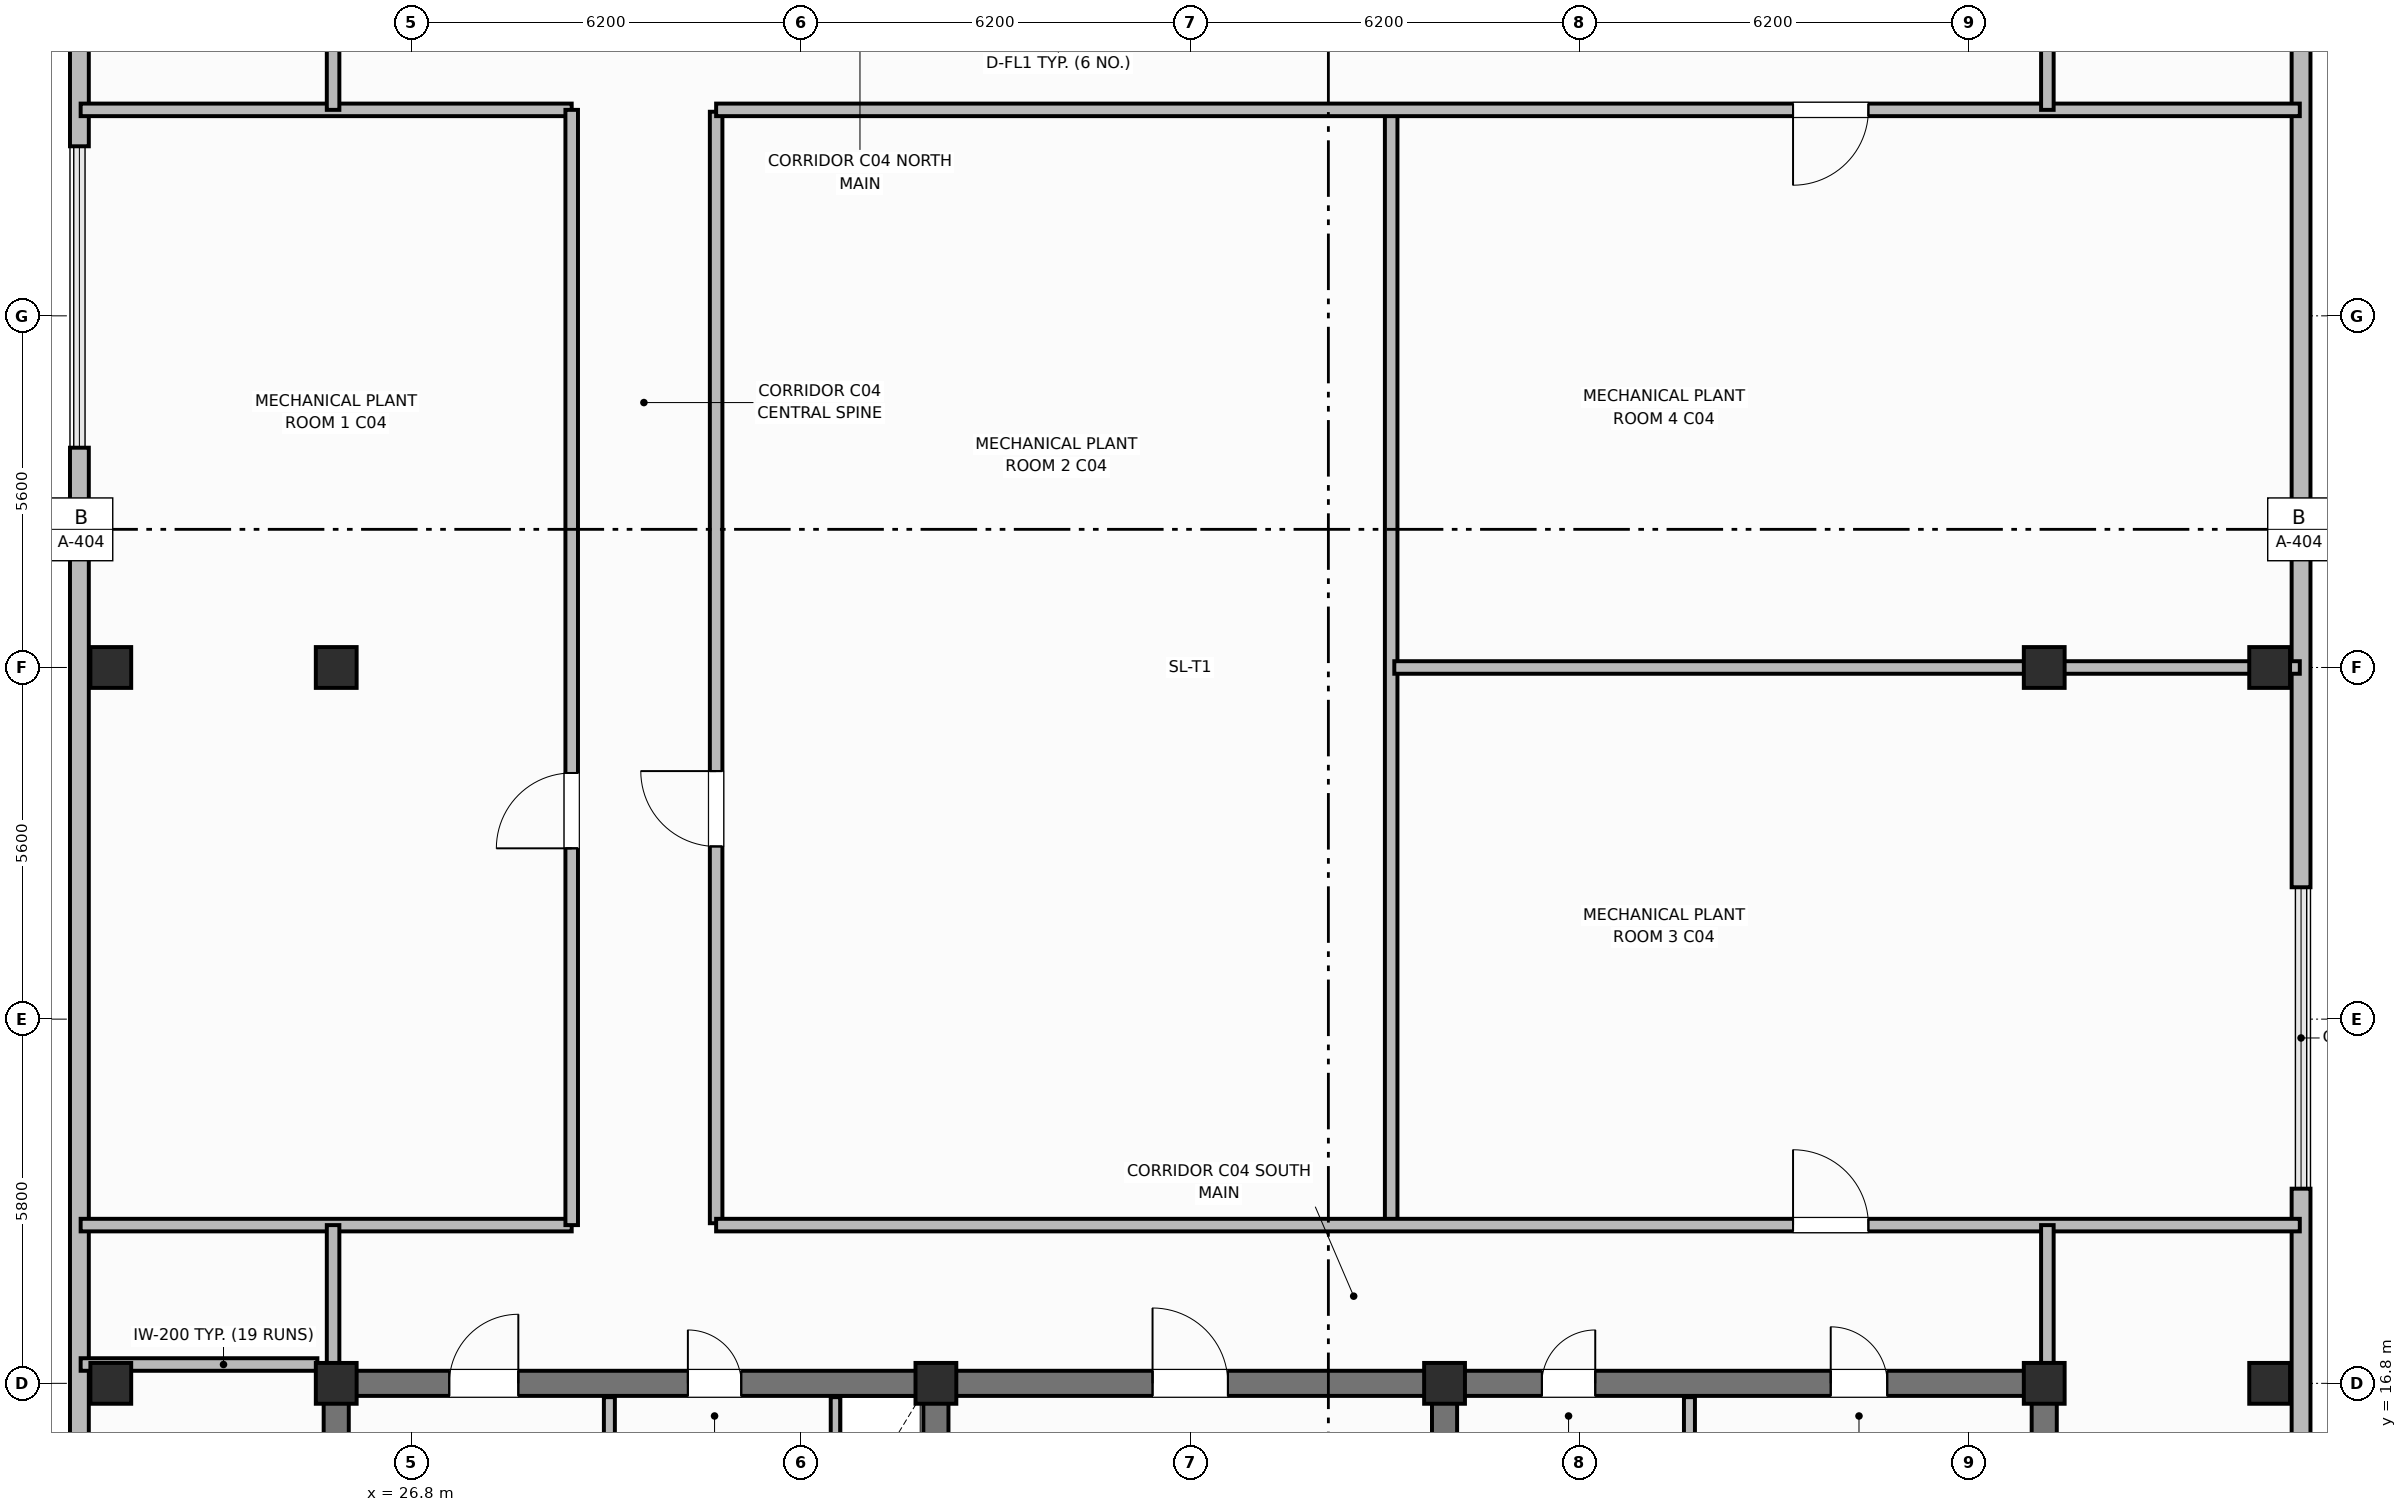
"""IFC4 building model, lengths in metres.
Left out: names, types, materials, properties, quantities, classifications, styles, units other than length and angle.
Written with IfcOpenShell. Run it as: python <this file> out.ifc"""

import sys

from ifc_helpers import new_model, si_unit, direction, frame, frame_2d, origin, origin_2d, place, context, subcontext, project, spatial, rectangle, extrude, element, fill, save


model = new_model("IFC4")
c1 = context("Model", 3, precision=1e-05, world=origin(), true_north=direction((0.0, 1.0)))
c2 = subcontext(c1, "Body", "Model", "MODEL_VIEW")
j1 = project(units=[si_unit("LENGTHUNIT", "METRE"), si_unit("PLANEANGLEUNIT", "RADIAN")], contexts=[c1])
p1 = place(None, origin())
s1 = spatial("IfcSite", under=j1, at=p1, CompositionType="ELEMENT")
p2 = place(p1, origin())
s2 = spatial("IfcBuilding", under=s1, at=p2, CompositionType="ELEMENT")
p3 = place(p2, frame((0.0, 0.0, 312.8)))
s3 = spatial("IfcBuildingStorey", under=s2, at=p3, CompositionType="ELEMENT", Elevation=312.8)
for number, where, z_axis, x_axis in (
    (1, (25.6, 10.8, 0.0), (0.0, 0.0, 1.0), (0.0, 1.0, 0.0)),
    (2, (52.8, 10.8, 0.0), (0.0, 0.0, 1.0), (0.0, 1.0, 0.0)),
):
    element("IfcWall", number, at=place(p3, frame(where, z_axis=z_axis, x_axis=x_axis)), inside=s3, PredefinedType="SHEAR", context=c2, shape_type="SweptSolid", body=[
        extrude(rectangle(XDim=5.8, YDim=0.4, at=frame_2d((2.9, 0.0))), origin(), (0.0, 0.0, 1.0), 3.6),
    ])
p4 = place(p3, frame((25.6, 16.8, 0.0), z_axis=(0.0, 0.0, 1.0), x_axis=(1.0, 0.0, 0.0)))
e3 = element("IfcWall", 3, at=p4, inside=s3, PredefinedType="SHEAR", context=c2, shape_type="SweptSolid", body=[
    extrude(rectangle(XDim=27.2, YDim=0.4, at=frame_2d((13.6, 0.0))), origin(), (0.0, 0.0, 1.0), 3.6),
])
p5 = place(p4, frame((1.8, 0.0, 0.0)))
e4 = element("IfcOpeningElement", 4, at=p5, cuts=e3, PredefinedType="OPENING", context=c2, shape_type="SweptSolid", body=[
    extrude(rectangle(XDim=1.1, YDim=2.15, at=frame_2d((0.55, 1.075))), frame((0.0, 0.21, 0.0), z_axis=(0.0, -1.0, 0.0), x_axis=(1.0, 0.0, 0.0)), (0.0, 0.0, 1.0), 0.42),
])
p6 = place(p4, frame((5.6, 0.0, 0.0)))
e5 = element("IfcOpeningElement", 5, at=p6, cuts=e3, PredefinedType="OPENING", context=c2, shape_type="SweptSolid", body=[
    extrude(rectangle(XDim=0.85, YDim=2.1, at=frame_2d((0.425, 1.05))), frame((0.0, 0.21, 0.0), z_axis=(0.0, -1.0, 0.0), x_axis=(1.0, 0.0, 0.0)), (0.0, 0.0, 1.0), 0.42),
])
p7 = place(p4, frame((13.0, 0.0, 0.0)))
e6 = element("IfcOpeningElement", 6, at=p7, cuts=e3, PredefinedType="OPENING", context=c2, shape_type="SweptSolid", body=[
    extrude(rectangle(XDim=1.2, YDim=2.15, at=frame_2d((0.6, 1.075))), frame((0.0, 0.21, 0.0), z_axis=(0.0, -1.0, 0.0), x_axis=(1.0, 0.0, 0.0)), (0.0, 0.0, 1.0), 0.42),
])
p8 = place(p4, frame((19.2, 0.0, 0.0)))
e7 = element("IfcOpeningElement", 7, at=p8, cuts=e3, PredefinedType="OPENING", context=c2, shape_type="SweptSolid", body=[
    extrude(rectangle(XDim=0.85, YDim=2.1, at=frame_2d((0.425, 1.05))), frame((0.0, 0.21, 0.0), z_axis=(0.0, -1.0, 0.0), x_axis=(1.0, 0.0, 0.0)), (0.0, 0.0, 1.0), 0.42),
])
p9 = place(p4, frame((23.8, 0.0, 0.0)))
e8 = element("IfcOpeningElement", 8, at=p9, cuts=e3, PredefinedType="OPENING", context=c2, shape_type="SweptSolid", body=[
    extrude(rectangle(XDim=0.9, YDim=2.1, at=frame_2d((0.45, 1.05))), frame((0.0, 0.21, 0.0), z_axis=(0.0, -1.0, 0.0), x_axis=(1.0, 0.0, 0.0)), (0.0, 0.0, 1.0), 0.42),
])
for number, where, z_axis, x_axis in (
    (9, (35.15, 10.8, 0.0), (0.0, 0.0, 1.0), (0.0, 1.0, 0.0)),
    (10, (43.25, 10.8, 0.0), (0.0, 0.0, 1.0), (0.0, 1.0, 0.0)),
):
    element("IfcWall", number, at=place(p3, frame(where, z_axis=z_axis, x_axis=x_axis)), inside=s3, PredefinedType="SHEAR", context=c2, shape_type="SweptSolid", body=[
        extrude(rectangle(XDim=5.8, YDim=0.4, at=frame_2d((2.9, 0.0))), origin(), (0.0, 0.0, 1.0), 3.6),
    ])
for number, where, z_axis, x_axis in (
    (11, (25.6, 16.8, 0.0), (0.0, 0.0, 1.0), (1.0, 0.0, 0.0)),
    (12, (35.15, 16.8, 0.0), (0.0, 0.0, 1.0), (1.0, 0.0, 0.0)),
    (13, (43.25, 16.8, 0.0), (0.0, 0.0, 1.0), (1.0, 0.0, 0.0)),
    (14, (52.8, 16.8, 0.0), (0.0, 0.0, 1.0), (1.0, 0.0, 0.0)),
    (15, (25.6, 28.2, 0.0), (0.0, 0.0, 1.0), (1.0, 0.0, 0.0)),
    (16, (52.8, 28.2, 0.0), (0.0, 0.0, 1.0), (1.0, 0.0, 0.0)),
    (17, (22.01, 16.8, 0.0), (0.0, 0.0, 1.0), (1.0, 0.0, 0.0)),
    (18, (56.39, 16.8, 0.0), (0.0, 0.0, 1.0), (1.0, 0.0, 0.0)),
    (19, (22.01, 28.2, 0.0), (0.0, 0.0, 1.0), (1.0, 0.0, 0.0)),
    (20, (56.39, 28.2, 0.0), (0.0, 0.0, 1.0), (1.0, 0.0, 0.0)),
):
    element("IfcColumn", number, at=place(p3, frame(where, z_axis=z_axis, x_axis=x_axis)), inside=s3, PredefinedType="COLUMN", context=c2, shape_type="SweptSolid", body=[
        extrude(rectangle(XDim=0.65, YDim=0.65, at=origin_2d()), origin(), (0.0, 0.0, 1.0), 3.6),
    ])
p10 = place(p3, frame((56.89, 12.25, 0.0), z_axis=(0.0, 0.0, 1.0), x_axis=(0.0, 1.0, 0.0)))
e21 = element("IfcWall", 21, at=p10, inside=s3, PredefinedType="SOLIDWALL", context=c2, shape_type="SweptSolid", body=[
    extrude(rectangle(XDim=7.65, YDim=0.3, at=frame_2d((3.825, 0.0))), origin(), (0.0, 0.0, 1.0), 2.84),
])
p11 = place(p3, frame((56.89, 24.7, 0.0), z_axis=(0.0, 0.0, 1.0), x_axis=(0.0, 1.0, 0.0)))
e22 = element("IfcWall", 22, at=p11, inside=s3, PredefinedType="SOLIDWALL", context=c2, shape_type="SweptSolid", body=[
    extrude(rectangle(XDim=19.45, YDim=0.3, at=frame_2d((9.725, 0.0))), origin(), (0.0, 0.0, 1.0), 2.84),
])
p12 = place(p3, frame((21.51, 44.15, 0.0), z_axis=(0.0, 0.0, 1.0), x_axis=(0.0, -1.0, 0.0)))
e23 = element("IfcWall", 23, at=p12, inside=s3, PredefinedType="SOLIDWALL", context=c2, shape_type="SweptSolid", body=[
    extrude(rectangle(XDim=7.65, YDim=0.3, at=frame_2d((3.825, 0.0))), origin(), (0.0, 0.0, 1.0), 2.84),
])
p13 = place(p3, frame((21.51, 31.7, 0.0), z_axis=(0.0, 0.0, 1.0), x_axis=(0.0, -1.0, 0.0)))
e24 = element("IfcWall", 24, at=p13, inside=s3, PredefinedType="SOLIDWALL", context=c2, shape_type="SweptSolid", body=[
    extrude(rectangle(XDim=19.45, YDim=0.3, at=frame_2d((9.725, 0.0))), origin(), (0.0, 0.0, 1.0), 2.84),
])
p14 = place(p3, frame((29.95, 14.5, 0.0), z_axis=(0.0, 0.0, 1.0), x_axis=(0.0, 1.0, 0.0)))
e25 = element("IfcWall", 25, at=p14, inside=s3, PredefinedType="PARTITIONING", context=c2, shape_type="SweptSolid", body=[
    extrude(rectangle(XDim=2.08, YDim=0.175, at=frame_2d((1.04, 0.0))), origin(), (0.0, 0.0, 1.0), 2.54),
])
p15 = place(p3, frame((33.55, 14.5, 0.0), z_axis=(0.0, 0.0, 1.0), x_axis=(0.0, 1.0, 0.0)))
e26 = element("IfcWall", 26, at=p15, inside=s3, PredefinedType="PARTITIONING", context=c2, shape_type="SweptSolid", body=[
    extrude(rectangle(XDim=2.08, YDim=0.15, at=frame_2d((1.04, 0.0))), origin(), (0.0, 0.0, 1.0), 2.54),
])
p16 = place(p15, frame((0.55, 0.0, 0.0)))
e27 = element("IfcOpeningElement", 27, at=p16, cuts=e26, PredefinedType="OPENING", context=c2, shape_type="SweptSolid", body=[
    extrude(rectangle(XDim=0.85, YDim=2.05, at=frame_2d((0.425, 1.025))), frame((0.0, 0.085, 0.0), z_axis=(0.0, -1.0, 0.0), x_axis=(1.0, 0.0, 0.0)), (0.0, 0.0, 1.0), 0.17),
])
p17 = place(p3, frame((47.15, 10.95, 0.0), z_axis=(0.0, 0.0, 1.0), x_axis=(0.0, 1.0, 0.0)))
e28 = element("IfcWall", 28, at=p17, inside=s3, PredefinedType="PARTITIONING", context=c2, shape_type="SweptSolid", body=[
    extrude(rectangle(XDim=5.63, YDim=0.175, at=frame_2d((2.815, 0.0))), origin(), (0.0, 0.0, 1.0), 2.54),
])
for number, where, z_axis, x_axis in (
    (29, (21.53, 19.32, 0.0), (0.0, 0.0, 1.0), (1.0, 0.0, 0.0)),
    (30, (21.53, 37.08, 0.0), (0.0, 0.0, 1.0), (1.0, 0.0, 0.0)),
):
    element("IfcWall", number, at=place(p3, frame(where, z_axis=z_axis, x_axis=x_axis)), inside=s3, PredefinedType="PARTITIONING", context=c2, shape_type="SweptSolid", body=[
        extrude(rectangle(XDim=7.82, YDim=0.2, at=frame_2d((3.91, 0.0))), origin(), (0.0, 0.0, 1.0), 2.54),
    ])
p18 = place(p3, frame((29.35, 19.32, 0.0), z_axis=(0.0, 0.0, 1.0), x_axis=(0.0, 1.0, 0.0)))
e31 = element("IfcWall", 31, at=p18, inside=s3, PredefinedType="PARTITIONING", context=c2, shape_type="SweptSolid", body=[
    extrude(rectangle(XDim=17.76, YDim=0.2, at=frame_2d((8.88, 0.0))), origin(), (0.0, 0.0, 1.0), 2.54),
])
p19 = place(p18, frame((6.0, 0.0, 0.0)))
e32 = element("IfcOpeningElement", 32, at=p19, cuts=e31, PredefinedType="OPENING", context=c2, shape_type="SweptSolid", body=[
    extrude(rectangle(XDim=1.2, YDim=2.15, at=frame_2d((0.6, 1.075))), frame((0.0, 0.11, 0.0), z_axis=(0.0, -1.0, 0.0), x_axis=(1.0, 0.0, 0.0)), (0.0, 0.0, 1.0), 0.22),
])
p20 = place(p3, frame((31.65, 19.35, 0.0), z_axis=(0.0, 0.0, 1.0), x_axis=(0.0, 1.0, 0.0)))
e33 = element("IfcWall", 33, at=p20, inside=s3, PredefinedType="PARTITIONING", context=c2, shape_type="SweptSolid", body=[
    extrude(rectangle(XDim=17.7, YDim=0.2, at=frame_2d((8.85, 0.0))), origin(), (0.0, 0.0, 1.0), 2.54),
])
p21 = place(p20, frame((6.0, 0.0, 0.0)))
e34 = element("IfcOpeningElement", 34, at=p21, cuts=e33, PredefinedType="OPENING", context=c2, shape_type="SweptSolid", body=[
    extrude(rectangle(XDim=1.2, YDim=2.15, at=frame_2d((0.6, 1.075))), frame((0.0, 0.11, 0.0), z_axis=(0.0, -1.0, 0.0), x_axis=(1.0, 0.0, 0.0)), (0.0, 0.0, 1.0), 0.22),
])
p22 = place(p3, frame((42.4, 19.35, 0.0), z_axis=(0.0, 0.0, 1.0), x_axis=(0.0, 1.0, 0.0)))
e35 = element("IfcWall", 35, at=p22, inside=s3, PredefinedType="PARTITIONING", context=c2, shape_type="SweptSolid", body=[
    extrude(rectangle(XDim=17.7, YDim=0.2, at=frame_2d((8.85, 0.0))), origin(), (0.0, 0.0, 1.0), 2.54),
])
p23 = place(p3, frame((42.45, 28.2, 0.0), z_axis=(0.0, 0.0, 1.0), x_axis=(1.0, 0.0, 0.0)))
e36 = element("IfcWall", 36, at=p23, inside=s3, PredefinedType="PARTITIONING", context=c2, shape_type="SweptSolid", body=[
    extrude(rectangle(XDim=14.42, YDim=0.2, at=frame_2d((7.21, 0.0))), origin(), (0.0, 0.0, 1.0), 2.54),
])
p24 = place(p3, frame((31.65, 19.32, 0.0), z_axis=(0.0, 0.0, 1.0), x_axis=(1.0, 0.0, 0.0)))
e37 = element("IfcWall", 37, at=p24, inside=s3, PredefinedType="PARTITIONING", context=c2, shape_type="SweptSolid", body=[
    extrude(rectangle(XDim=25.22, YDim=0.2, at=frame_2d((12.61, 0.0))), origin(), (0.0, 0.0, 1.0), 2.54),
])
p25 = place(p24, frame((17.15, 0.0, 0.0)))
e38 = element("IfcOpeningElement", 38, at=p25, cuts=e37, PredefinedType="OPENING", context=c2, shape_type="SweptSolid", body=[
    extrude(rectangle(XDim=1.2, YDim=2.15, at=frame_2d((0.6, 1.075))), frame((0.0, 0.11, 0.0), z_axis=(0.0, -1.0, 0.0), x_axis=(1.0, 0.0, 0.0)), (0.0, 0.0, 1.0), 0.22),
])
p26 = place(p3, frame((56.87, 37.08, 0.0), z_axis=(0.0, 0.0, 1.0), x_axis=(-1.0, 0.0, 0.0)))
e39 = element("IfcWall", 39, at=p26, inside=s3, PredefinedType="PARTITIONING", context=c2, shape_type="SweptSolid", body=[
    extrude(rectangle(XDim=25.22, YDim=0.2, at=frame_2d((12.61, 0.0))), origin(), (0.0, 0.0, 1.0), 2.54),
])
p27 = place(p26, frame((6.87, 0.0, 0.0)))
e40 = element("IfcOpeningElement", 40, at=p27, cuts=e39, PredefinedType="OPENING", context=c2, shape_type="SweptSolid", body=[
    extrude(rectangle(XDim=1.2, YDim=2.15, at=frame_2d((0.6, 1.075))), frame((0.0, 0.11, 0.0), z_axis=(0.0, -1.0, 0.0), x_axis=(1.0, 0.0, 0.0)), (0.0, 0.0, 1.0), 0.22),
])
p28 = place(p3, frame((52.85, 16.95, 0.0), z_axis=(0.0, 0.0, 1.0), x_axis=(0.0, 1.0, 0.0)))
e41 = element("IfcWall", 41, at=p28, inside=s3, PredefinedType="PARTITIONING", context=c2, shape_type="SweptSolid", body=[
    extrude(rectangle(XDim=2.37, YDim=0.2, at=frame_2d((1.185, 0.0))), origin(), (0.0, 0.0, 1.0), 2.54),
])
p29 = place(p3, frame((52.85, 37.08, 0.0), z_axis=(0.0, 0.0, 1.0), x_axis=(0.0, 1.0, 0.0)))
e42 = element("IfcWall", 42, at=p29, inside=s3, PredefinedType="PARTITIONING", context=c2, shape_type="SweptSolid", body=[
    extrude(rectangle(XDim=2.37, YDim=0.2, at=frame_2d((1.185, 0.0))), origin(), (0.0, 0.0, 1.0), 2.54),
])
p30 = place(p3, frame((25.55, 16.95, 0.0), z_axis=(0.0, 0.0, 1.0), x_axis=(0.0, 1.0, 0.0)))
e43 = element("IfcWall", 43, at=p30, inside=s3, PredefinedType="PARTITIONING", context=c2, shape_type="SweptSolid", body=[
    extrude(rectangle(XDim=2.37, YDim=0.2, at=frame_2d((1.185, 0.0))), origin(), (0.0, 0.0, 1.0), 2.54),
])
p31 = place(p3, frame((25.55, 37.08, 0.0), z_axis=(0.0, 0.0, 1.0), x_axis=(0.0, 1.0, 0.0)))
e44 = element("IfcWall", 44, at=p31, inside=s3, PredefinedType="PARTITIONING", context=c2, shape_type="SweptSolid", body=[
    extrude(rectangle(XDim=2.37, YDim=0.2, at=frame_2d((1.185, 0.0))), origin(), (0.0, 0.0, 1.0), 2.54),
])
p32 = place(p3, frame((21.53, 17.1, 0.0), z_axis=(0.0, 0.0, 1.0), x_axis=(1.0, 0.0, 0.0)))
e45 = element("IfcWall", 45, at=p32, inside=s3, PredefinedType="PARTITIONING", context=c2, shape_type="SweptSolid", body=[
    extrude(rectangle(XDim=3.77, YDim=0.2, at=frame_2d((1.885, 0.0))), origin(), (0.0, 0.0, 1.0), 2.54),
])
p33 = place(p19, origin())
e46 = element("IfcDoor", 46, at=p33, inside=s3, OperationType="SINGLE_SWING_LEFT", PredefinedType="DOOR", context=c2, shape_type="SweptSolid", body=[
    extrude(rectangle(XDim=1.2, YDim=2.15, at=frame_2d((0.6, 1.075))), frame((0.0, 0.025, 0.0), z_axis=(0.0, -1.0, 0.0), x_axis=(1.0, 0.0, 0.0)), (0.0, 0.0, 1.0), 0.05),
])
fill(e32, e46)
p34 = place(p21, origin())
e47 = element("IfcDoor", 47, at=p34, inside=s3, OperationType="SINGLE_SWING_RIGHT", PredefinedType="DOOR", context=c2, shape_type="SweptSolid", body=[
    extrude(rectangle(XDim=1.2, YDim=2.15, at=frame_2d((0.6, 1.075))), frame((0.0, 0.025, 0.0), z_axis=(0.0, -1.0, 0.0), x_axis=(1.0, 0.0, 0.0)), (0.0, 0.0, 1.0), 0.05),
])
fill(e34, e47)
p35 = place(p25, origin())
e48 = element("IfcDoor", 48, at=p35, inside=s3, OperationType="SINGLE_SWING_LEFT", PredefinedType="DOOR", context=c2, shape_type="SweptSolid", body=[
    extrude(rectangle(XDim=1.2, YDim=2.15, at=frame_2d((0.6, 1.075))), frame((0.0, 0.025, 0.0), z_axis=(0.0, -1.0, 0.0), x_axis=(1.0, 0.0, 0.0)), (0.0, 0.0, 1.0), 0.05),
])
fill(e38, e48)
p36 = place(p27, origin())
e49 = element("IfcDoor", 49, at=p36, inside=s3, OperationType="SINGLE_SWING_RIGHT", PredefinedType="DOOR", context=c2, shape_type="SweptSolid", body=[
    extrude(rectangle(XDim=1.2, YDim=2.15, at=frame_2d((0.6, 1.075))), frame((0.0, 0.025, 0.0), z_axis=(0.0, -1.0, 0.0), x_axis=(1.0, 0.0, 0.0)), (0.0, 0.0, 1.0), 0.05),
])
fill(e40, e49)
p37 = place(p5, origin())
e50 = element("IfcDoor", 50, at=p37, inside=s3, OperationType="SINGLE_SWING_RIGHT", PredefinedType="DOOR", context=c2, shape_type="SweptSolid", body=[
    extrude(rectangle(XDim=1.1, YDim=2.15, at=frame_2d((0.55, 1.075))), frame((0.0, 0.025, 0.0), z_axis=(0.0, -1.0, 0.0), x_axis=(1.0, 0.0, 0.0)), (0.0, 0.0, 1.0), 0.05),
])
fill(e4, e50)
p38 = place(p6, origin())
e51 = element("IfcDoor", 51, at=p38, inside=s3, OperationType="SINGLE_SWING_LEFT", PredefinedType="DOOR", context=c2, shape_type="SweptSolid", body=[
    extrude(rectangle(XDim=0.85, YDim=2.1, at=frame_2d((0.425, 1.05))), frame((0.0, 0.025, 0.0), z_axis=(0.0, -1.0, 0.0), x_axis=(1.0, 0.0, 0.0)), (0.0, 0.0, 1.0), 0.05),
])
fill(e5, e51)
p39 = place(p7, origin())
e52 = element("IfcDoor", 52, at=p39, inside=s3, OperationType="SINGLE_SWING_LEFT", PredefinedType="DOOR", context=c2, shape_type="SweptSolid", body=[
    extrude(rectangle(XDim=1.2, YDim=2.15, at=frame_2d((0.6, 1.075))), frame((0.0, 0.025, 0.0), z_axis=(0.0, -1.0, 0.0), x_axis=(1.0, 0.0, 0.0)), (0.0, 0.0, 1.0), 0.05),
])
fill(e6, e52)
p40 = place(p8, origin())
e53 = element("IfcDoor", 53, at=p40, inside=s3, OperationType="SINGLE_SWING_RIGHT", PredefinedType="DOOR", context=c2, shape_type="SweptSolid", body=[
    extrude(rectangle(XDim=0.85, YDim=2.1, at=frame_2d((0.425, 1.05))), frame((0.0, 0.025, 0.0), z_axis=(0.0, -1.0, 0.0), x_axis=(1.0, 0.0, 0.0)), (0.0, 0.0, 1.0), 0.05),
])
fill(e7, e53)
p41 = place(p9, origin())
e54 = element("IfcDoor", 54, at=p41, inside=s3, OperationType="SINGLE_SWING_LEFT", PredefinedType="DOOR", context=c2, shape_type="SweptSolid", body=[
    extrude(rectangle(XDim=0.9, YDim=2.1, at=frame_2d((0.45, 1.05))), frame((0.0, 0.025, 0.0), z_axis=(0.0, -1.0, 0.0), x_axis=(1.0, 0.0, 0.0)), (0.0, 0.0, 1.0), 0.05),
])
fill(e8, e54)
save(model, sys.argv[1])
